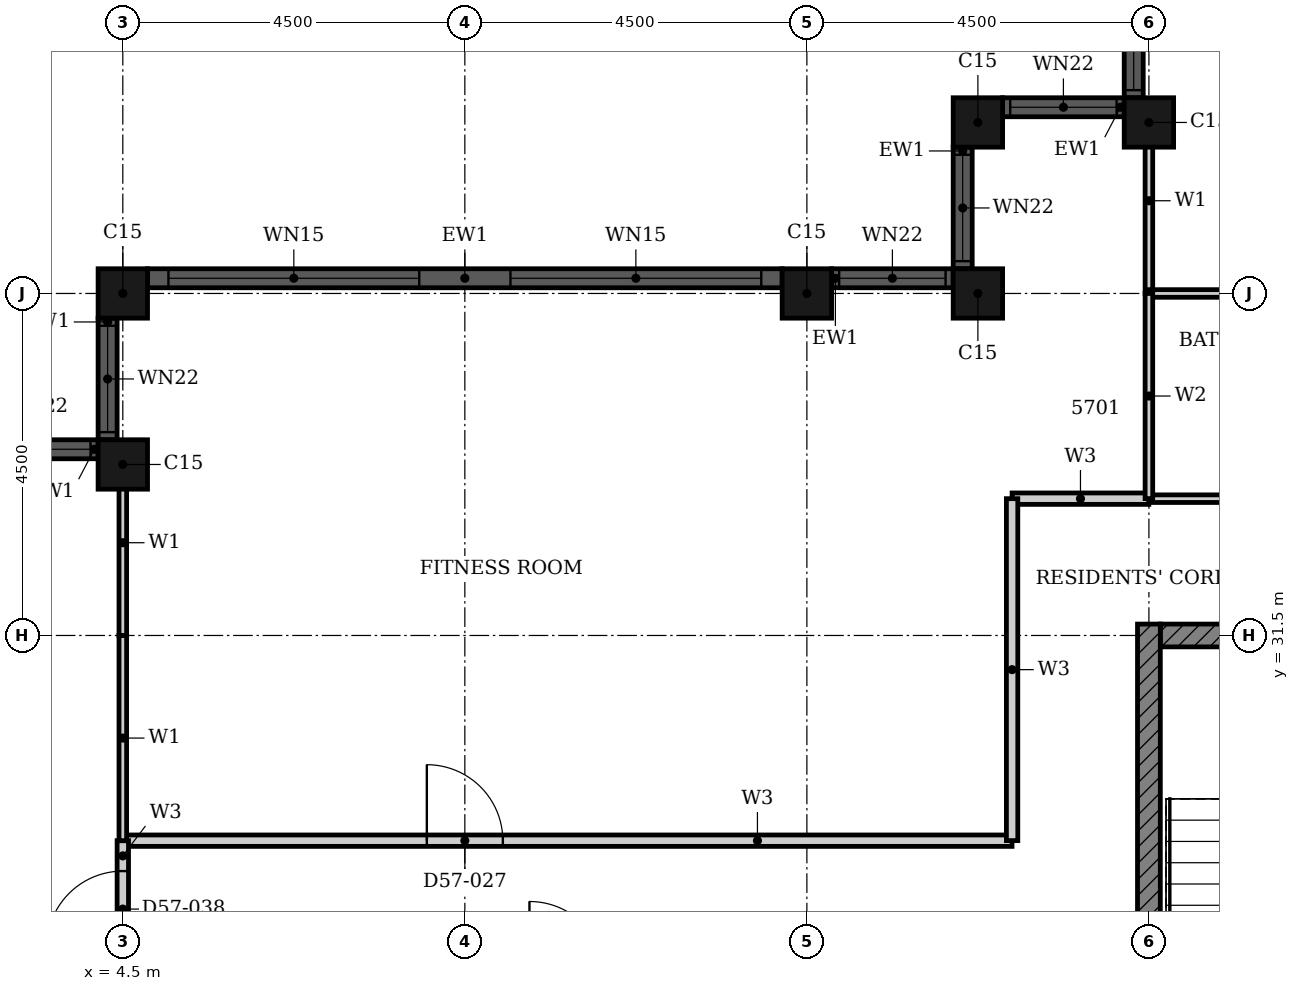
"""IFC4 building model, lengths in metres.
Left out: names, types, materials, properties, quantities, classifications, styles, units other than length and angle.
Written with IfcOpenShell. Run it as: python <this file> out.ifc"""

import sys

from ifc_helpers import new_model, si_unit, direction, frame, frame_2d, origin, origin_2d, place, context, subcontext, project, spatial, rectangle, hollow_rectangle, extrude, element, fill, save


model = new_model("IFC4")
c1 = context("Model", 3, precision=1e-05, world=origin(), true_north=direction((0.0, 1.0)))
c2 = subcontext(c1, "Body", "Model", "MODEL_VIEW")
j1 = project(units=[si_unit("LENGTHUNIT", "METRE"), si_unit("PLANEANGLEUNIT", "RADIAN")], contexts=[c1])
p1 = place(None, origin())
s1 = spatial("IfcSite", under=j1, at=p1, CompositionType="ELEMENT")
p2 = place(p1, origin())
s2 = spatial("IfcBuilding", under=s1, at=p2, CompositionType="ELEMENT")
p3 = place(p2, frame((0.0, 0.0, 225.7)))
s3 = spatial("IfcBuildingStorey", under=s2, at=p3, CompositionType="ELEMENT", Elevation=225.7)
for number, where, z_axis, x_axis in (
    (1, (18.0, 38.25, 0.0), (0.0, 0.0, 1.0), (1.0, 0.0, 0.0)),
    (2, (15.75, 38.25, 0.0), (0.0, 0.0, 1.0), (1.0, 0.0, 0.0)),
    (3, (15.75, 36.0, 0.0), (0.0, 0.0, 1.0), (1.0, 0.0, 0.0)),
    (4, (13.5, 36.0, 0.0), (0.0, 0.0, 1.0), (1.0, 0.0, 0.0)),
    (5, (4.5, 36.0, 0.0), (0.0, 0.0, 1.0), (1.0, 0.0, 0.0)),
    (6, (4.5, 33.75, 0.0), (0.0, 0.0, 1.0), (1.0, 0.0, 0.0)),
):
    element("IfcColumn", number, at=place(p3, frame(where, z_axis=z_axis, x_axis=x_axis)), inside=s3, PredefinedType="COLUMN", context=c2, shape_type="SweptSolid", body=[
        extrude(hollow_rectangle(XDim=0.65, YDim=0.65, WallThickness=0.021, at=origin_2d()), origin(), (0.0, 0.0, 1.0), 3.7),
    ])
p4 = place(p3, frame((17.8, 40.175, 0.0), z_axis=(0.0, 0.0, 1.0), x_axis=(0.0, -1.0, 0.0)))
e7 = element("IfcWall", 7, at=p4, inside=s3, PredefinedType="SOLIDWALL", context=c2, shape_type="SweptSolid", body=[
    extrude(rectangle(XDim=1.6, YDim=0.25, at=frame_2d((0.8, 0.0))), origin(), (0.0, 0.0, 1.0), 3.7),
])
p5 = place(p4, frame((0.1, 0.0, 0.9)))
e8 = element("IfcOpeningElement", 8, at=p5, cuts=e7, PredefinedType="OPENING", context=c2, shape_type="SweptSolid", body=[
    extrude(rectangle(XDim=1.4, YDim=1.85, at=frame_2d((0.7, 0.925))), frame((0.0, 0.135, 0.0), z_axis=(0.0, -1.0, 0.0), x_axis=(1.0, 0.0, 0.0)), (0.0, 0.0, 1.0), 0.27),
])
p6 = place(p3, frame((17.675, 38.45, 0.0), z_axis=(0.0, 0.0, 1.0), x_axis=(-1.0, 0.0, 0.0)))
e9 = element("IfcWall", 9, at=p6, inside=s3, PredefinedType="SOLIDWALL", context=c2, shape_type="SweptSolid", body=[
    extrude(rectangle(XDim=1.6, YDim=0.25, at=frame_2d((0.8, 0.0))), origin(), (0.0, 0.0, 1.0), 3.7),
])
p7 = place(p6, frame((0.1, 0.0, 0.9)))
e10 = element("IfcOpeningElement", 10, at=p7, cuts=e9, PredefinedType="OPENING", context=c2, shape_type="SweptSolid", body=[
    extrude(rectangle(XDim=1.4, YDim=1.85, at=frame_2d((0.7, 0.925))), frame((0.0, 0.135, 0.0), z_axis=(0.0, -1.0, 0.0), x_axis=(1.0, 0.0, 0.0)), (0.0, 0.0, 1.0), 0.27),
])
p8 = place(p3, frame((15.55, 37.925, 0.0), z_axis=(0.0, 0.0, 1.0), x_axis=(0.0, -1.0, 0.0)))
e11 = element("IfcWall", 11, at=p8, inside=s3, PredefinedType="SOLIDWALL", context=c2, shape_type="SweptSolid", body=[
    extrude(rectangle(XDim=1.6, YDim=0.25, at=frame_2d((0.8, 0.0))), origin(), (0.0, 0.0, 1.0), 3.7),
])
p9 = place(p8, frame((0.1, 0.0, 0.9)))
e12 = element("IfcOpeningElement", 12, at=p9, cuts=e11, PredefinedType="OPENING", context=c2, shape_type="SweptSolid", body=[
    extrude(rectangle(XDim=1.4, YDim=1.85, at=frame_2d((0.7, 0.925))), frame((0.0, 0.135, 0.0), z_axis=(0.0, -1.0, 0.0), x_axis=(1.0, 0.0, 0.0)), (0.0, 0.0, 1.0), 0.27),
])
p10 = place(p3, frame((15.425, 36.2, 0.0), z_axis=(0.0, 0.0, 1.0), x_axis=(-1.0, 0.0, 0.0)))
e13 = element("IfcWall", 13, at=p10, inside=s3, PredefinedType="SOLIDWALL", context=c2, shape_type="SweptSolid", body=[
    extrude(rectangle(XDim=1.6, YDim=0.25, at=frame_2d((0.8, 0.0))), origin(), (0.0, 0.0, 1.0), 3.7),
])
p11 = place(p10, frame((0.1, 0.0, 0.9)))
e14 = element("IfcOpeningElement", 14, at=p11, cuts=e13, PredefinedType="OPENING", context=c2, shape_type="SweptSolid", body=[
    extrude(rectangle(XDim=1.4, YDim=1.85, at=frame_2d((0.7, 0.925))), frame((0.0, 0.135, 0.0), z_axis=(0.0, -1.0, 0.0), x_axis=(1.0, 0.0, 0.0)), (0.0, 0.0, 1.0), 0.27),
])
p12 = place(p3, frame((13.175, 36.2, 0.0), z_axis=(0.0, 0.0, 1.0), x_axis=(-1.0, 0.0, 0.0)))
e15 = element("IfcWall", 15, at=p12, inside=s3, PredefinedType="SOLIDWALL", context=c2, shape_type="SweptSolid", body=[
    extrude(rectangle(XDim=8.35, YDim=0.25, at=frame_2d((4.175, 0.0))), origin(), (0.0, 0.0, 1.0), 3.7),
])
p13 = place(p12, frame((0.275, 0.0, 0.45)))
e16 = element("IfcOpeningElement", 16, at=p13, cuts=e15, PredefinedType="OPENING", context=c2, shape_type="SweptSolid", body=[
    extrude(rectangle(XDim=3.3, YDim=2.3, at=frame_2d((1.65, 1.15))), frame((0.0, 0.135, 0.0), z_axis=(0.0, -1.0, 0.0), x_axis=(1.0, 0.0, 0.0)), (0.0, 0.0, 1.0), 0.27),
])
p14 = place(p12, frame((4.775, 0.0, 0.45)))
e17 = element("IfcOpeningElement", 17, at=p14, cuts=e15, PredefinedType="OPENING", context=c2, shape_type="SweptSolid", body=[
    extrude(rectangle(XDim=3.3, YDim=2.3, at=frame_2d((1.65, 1.15))), frame((0.0, 0.135, 0.0), z_axis=(0.0, -1.0, 0.0), x_axis=(1.0, 0.0, 0.0)), (0.0, 0.0, 1.0), 0.27),
])
p15 = place(p3, frame((4.3, 35.675, 0.0), z_axis=(0.0, 0.0, 1.0), x_axis=(0.0, -1.0, 0.0)))
e18 = element("IfcWall", 18, at=p15, inside=s3, PredefinedType="SOLIDWALL", context=c2, shape_type="SweptSolid", body=[
    extrude(rectangle(XDim=1.6, YDim=0.25, at=frame_2d((0.8, 0.0))), origin(), (0.0, 0.0, 1.0), 3.7),
])
p16 = place(p15, frame((0.1, 0.0, 0.9)))
e19 = element("IfcOpeningElement", 19, at=p16, cuts=e18, PredefinedType="OPENING", context=c2, shape_type="SweptSolid", body=[
    extrude(rectangle(XDim=1.4, YDim=1.85, at=frame_2d((0.7, 0.925))), frame((0.0, 0.135, 0.0), z_axis=(0.0, -1.0, 0.0), x_axis=(1.0, 0.0, 0.0)), (0.0, 0.0, 1.0), 0.27),
])
p17 = place(p3, frame((4.175, 33.95, 0.0), z_axis=(0.0, 0.0, 1.0), x_axis=(-1.0, 0.0, 0.0)))
e20 = element("IfcWall", 20, at=p17, inside=s3, PredefinedType="SOLIDWALL", context=c2, shape_type="SweptSolid", body=[
    extrude(rectangle(XDim=1.6, YDim=0.25, at=frame_2d((0.8, 0.0))), origin(), (0.0, 0.0, 1.0), 3.7),
])
p18 = place(p17, frame((0.1, 0.0, 0.9)))
e21 = element("IfcOpeningElement", 21, at=p18, cuts=e20, PredefinedType="OPENING", context=c2, shape_type="SweptSolid", body=[
    extrude(rectangle(XDim=1.4, YDim=1.85, at=frame_2d((0.7, 0.925))), frame((0.0, 0.135, 0.0), z_axis=(0.0, -1.0, 0.0), x_axis=(1.0, 0.0, 0.0)), (0.0, 0.0, 1.0), 0.27),
])
p19 = place(p3, frame((18.15, 31.5, 0.0), z_axis=(0.0, 0.0, 1.0), x_axis=(1.0, 0.0, 0.0)))
e22 = element("IfcWall", 22, at=p19, inside=s3, PredefinedType="SHEAR", context=c2, shape_type="SweptSolid", body=[
    extrude(rectangle(XDim=9.368, YDim=0.3, at=frame_2d((4.684, 0.0))), origin(), (0.0, 0.0, 1.0), 3.4),
])
p20 = place(p19, frame((4.736, 0.0, 0.0)))
e23 = element("IfcOpeningElement", 23, at=p20, cuts=e22, PredefinedType="OPENING", context=c2, shape_type="SweptSolid", body=[
    extrude(rectangle(XDim=1.8, YDim=2.1, at=frame_2d((0.9, 1.05))), frame((0.0, 0.16, 0.0), z_axis=(0.0, -1.0, 0.0), x_axis=(1.0, 0.0, 0.0)), (0.0, 0.0, 1.0), 0.32),
])
p21 = place(p3, frame((18.0, 22.35, 0.0), z_axis=(0.0, 0.0, 1.0), x_axis=(0.0, 1.0, 0.0)))
e24 = element("IfcWall", 24, at=p21, inside=s3, PredefinedType="SHEAR", context=c2, shape_type="SweptSolid", body=[
    extrude(rectangle(XDim=9.3, YDim=0.3, at=frame_2d((4.65, 0.0))), origin(), (0.0, 0.0, 1.0), 3.4),
])
p22 = place(p3, frame((4.5, 28.8, 0.0), z_axis=(0.0, 0.0, 1.0), x_axis=(1.0, 0.0, 0.0)))
e25 = element("IfcWall", 25, at=p22, inside=s3, PredefinedType="PARTITIONING", context=c2, shape_type="SweptSolid", body=[
    extrude(rectangle(XDim=11.699, YDim=0.15, at=frame_2d((5.85, 0.0))), origin(), (0.0, 0.0, 1.0), 3.4),
])
p23 = place(p22, frame((4.0, 0.0, 0.0)))
e26 = element("IfcOpeningElement", 26, at=p23, cuts=e25, PredefinedType="OPENING", context=c2, shape_type="SweptSolid", body=[
    extrude(rectangle(XDim=1.0, YDim=2.1, at=frame_2d((0.5, 1.05))), frame((0.0, 0.085, 0.0), z_axis=(0.0, -1.0, 0.0), x_axis=(1.0, 0.0, 0.0)), (0.0, 0.0, 1.0), 0.17),
])
p24 = place(p3, frame((16.2, 33.3, 0.0), z_axis=(0.0, 0.0, 1.0), x_axis=(1.0, 0.0, 0.0)))
e27 = element("IfcWall", 27, at=p24, inside=s3, PredefinedType="PARTITIONING", context=c2, shape_type="SweptSolid", body=[
    extrude(rectangle(XDim=1.799, YDim=0.15, at=frame_2d((0.899, 0.0))), origin(), (0.0, 0.0, 1.0), 3.4),
])
p25 = place(p3, frame((16.2, 28.801, 0.0), z_axis=(0.0, 0.0, 1.0), x_axis=(0.0, 1.0, 0.0)))
e28 = element("IfcWall", 28, at=p25, inside=s3, PredefinedType="PARTITIONING", context=c2, shape_type="SweptSolid", body=[
    extrude(rectangle(XDim=4.499, YDim=0.15, at=frame_2d((2.25, 0.0))), origin(), (0.0, 0.0, 1.0), 3.4),
])
p26 = place(p3, frame((4.5, 27.0, 0.0), z_axis=(0.0, 0.0, 1.0), x_axis=(0.0, 1.0, 0.0)))
e29 = element("IfcWall", 29, at=p26, inside=s3, PredefinedType="PARTITIONING", context=c2, shape_type="SweptSolid", body=[
    extrude(rectangle(XDim=1.8, YDim=0.15, at=frame_2d((0.9, 0.0))), origin(), (0.0, 0.0, 1.0), 3.4),
])
p27 = place(p26, frame((0.4, 0.0, 0.0)))
e30 = element("IfcOpeningElement", 30, at=p27, cuts=e29, PredefinedType="OPENING", context=c2, shape_type="SweptSolid", body=[
    extrude(rectangle(XDim=1.0, YDim=2.1, at=frame_2d((0.5, 1.05))), frame((0.0, 0.085, 0.0), z_axis=(0.0, -1.0, 0.0), x_axis=(1.0, 0.0, 0.0)), (0.0, 0.0, 1.0), 0.17),
])
p28 = place(p3, frame((18.0, 36.0, 0.0), z_axis=(0.0, 0.0, 1.0), x_axis=(0.0, 1.0, 0.0)))
e31 = element("IfcWall", 31, at=p28, inside=s3, PredefinedType="PARTITIONING", context=c2, shape_type="SweptSolid", body=[
    extrude(rectangle(XDim=2.44, YDim=0.1, at=frame_2d((1.22, 0.0))), origin(), (0.0, 0.0, 1.0), 3.4),
])
p29 = place(p3, frame((4.5, 28.8, 0.0), z_axis=(0.0, 0.0, 1.0), x_axis=(0.0, 1.0, 0.0)))
e32 = element("IfcWall", 32, at=p29, inside=s3, PredefinedType="PARTITIONING", context=c2, shape_type="SweptSolid", body=[
    extrude(rectangle(XDim=2.7, YDim=0.1, at=frame_2d((1.35, 0.0))), origin(), (0.0, 0.0, 1.0), 3.4),
])
p30 = place(p3, frame((4.5, 31.501, 0.0), z_axis=(0.0, 0.0, 1.0), x_axis=(0.0, 1.0, 0.0)))
e33 = element("IfcWall", 33, at=p30, inside=s3, PredefinedType="PARTITIONING", context=c2, shape_type="SweptSolid", body=[
    extrude(rectangle(XDim=2.439, YDim=0.1, at=frame_2d((1.219, 0.0))), origin(), (0.0, 0.0, 1.0), 3.4),
])
for number, where, z_axis, x_axis in (
    (34, (18.0, 33.3, 0.0), (0.0, 0.0, 1.0), (1.0, 0.0, 0.0)),
    (35, (18.0, 36.0, 0.0), (0.0, 0.0, 1.0), (1.0, 0.0, 0.0)),
):
    element("IfcWall", number, at=place(p3, frame(where, z_axis=z_axis, x_axis=x_axis)), inside=s3, PredefinedType="PARTITIONING", context=c2, shape_type="SweptSolid", body=[
        extrude(rectangle(XDim=2.4, YDim=0.1, at=frame_2d((1.2, 0.0))), origin(), (0.0, 0.0, 1.0), 3.4),
    ])
p31 = place(p3, frame((18.0, 33.301, 0.0), z_axis=(0.0, 0.0, 1.0), x_axis=(0.0, 1.0, 0.0)))
e36 = element("IfcWall", 36, at=p31, inside=s3, PredefinedType="PARTITIONING", context=c2, shape_type="SweptSolid", body=[
    extrude(rectangle(XDim=2.699, YDim=0.1, at=frame_2d((1.35, 0.0))), origin(), (0.0, 0.0, 1.0), 3.4),
])
p32 = place(p5, origin())
e37 = element("IfcWindow", 37, at=p32, inside=s3, PartitioningType="SINGLE_PANEL", PredefinedType="WINDOW", context=c2, shape_type="SweptSolid", body=[
    extrude(rectangle(XDim=1.4, YDim=1.85, at=frame_2d((0.7, 0.925))), frame((0.0, 0.03, 0.0), z_axis=(0.0, -1.0, 0.0), x_axis=(1.0, 0.0, 0.0)), (0.0, 0.0, 1.0), 0.06),
])
fill(e8, e37)
p33 = place(p7, origin())
e38 = element("IfcWindow", 38, at=p33, inside=s3, PartitioningType="SINGLE_PANEL", PredefinedType="WINDOW", context=c2, shape_type="SweptSolid", body=[
    extrude(rectangle(XDim=1.4, YDim=1.85, at=frame_2d((0.7, 0.925))), frame((0.0, 0.03, 0.0), z_axis=(0.0, -1.0, 0.0), x_axis=(1.0, 0.0, 0.0)), (0.0, 0.0, 1.0), 0.06),
])
fill(e10, e38)
p34 = place(p9, origin())
e39 = element("IfcWindow", 39, at=p34, inside=s3, PartitioningType="SINGLE_PANEL", PredefinedType="WINDOW", context=c2, shape_type="SweptSolid", body=[
    extrude(rectangle(XDim=1.4, YDim=1.85, at=frame_2d((0.7, 0.925))), frame((0.0, 0.03, 0.0), z_axis=(0.0, -1.0, 0.0), x_axis=(1.0, 0.0, 0.0)), (0.0, 0.0, 1.0), 0.06),
])
fill(e12, e39)
p35 = place(p11, origin())
e40 = element("IfcWindow", 40, at=p35, inside=s3, PartitioningType="SINGLE_PANEL", PredefinedType="WINDOW", context=c2, shape_type="SweptSolid", body=[
    extrude(rectangle(XDim=1.4, YDim=1.85, at=frame_2d((0.7, 0.925))), frame((0.0, 0.03, 0.0), z_axis=(0.0, -1.0, 0.0), x_axis=(1.0, 0.0, 0.0)), (0.0, 0.0, 1.0), 0.06),
])
fill(e14, e40)
p36 = place(p13, origin())
e41 = element("IfcWindow", 41, at=p36, inside=s3, PartitioningType="SINGLE_PANEL", PredefinedType="WINDOW", context=c2, shape_type="SweptSolid", body=[
    extrude(rectangle(XDim=3.3, YDim=2.3, at=frame_2d((1.65, 1.15))), frame((0.0, 0.03, 0.0), z_axis=(0.0, -1.0, 0.0), x_axis=(1.0, 0.0, 0.0)), (0.0, 0.0, 1.0), 0.06),
])
fill(e16, e41)
p37 = place(p14, origin())
e42 = element("IfcWindow", 42, at=p37, inside=s3, PartitioningType="SINGLE_PANEL", PredefinedType="WINDOW", context=c2, shape_type="SweptSolid", body=[
    extrude(rectangle(XDim=3.3, YDim=2.3, at=frame_2d((1.65, 1.15))), frame((0.0, 0.03, 0.0), z_axis=(0.0, -1.0, 0.0), x_axis=(1.0, 0.0, 0.0)), (0.0, 0.0, 1.0), 0.06),
])
fill(e17, e42)
p38 = place(p16, origin())
e43 = element("IfcWindow", 43, at=p38, inside=s3, PartitioningType="SINGLE_PANEL", PredefinedType="WINDOW", context=c2, shape_type="SweptSolid", body=[
    extrude(rectangle(XDim=1.4, YDim=1.85, at=frame_2d((0.7, 0.925))), frame((0.0, 0.03, 0.0), z_axis=(0.0, -1.0, 0.0), x_axis=(1.0, 0.0, 0.0)), (0.0, 0.0, 1.0), 0.06),
])
fill(e19, e43)
p39 = place(p18, origin())
e44 = element("IfcWindow", 44, at=p39, inside=s3, PartitioningType="SINGLE_PANEL", PredefinedType="WINDOW", context=c2, shape_type="SweptSolid", body=[
    extrude(rectangle(XDim=1.4, YDim=1.85, at=frame_2d((0.7, 0.925))), frame((0.0, 0.03, 0.0), z_axis=(0.0, -1.0, 0.0), x_axis=(1.0, 0.0, 0.0)), (0.0, 0.0, 1.0), 0.06),
])
fill(e21, e44)
p40 = place(p23, origin())
e45 = element("IfcDoor", 45, at=p40, inside=s3, OperationType="SINGLE_SWING_LEFT", PredefinedType="DOOR", context=c2, shape_type="SweptSolid", body=[
    extrude(rectangle(XDim=1.0, YDim=2.1, at=frame_2d((0.5, 1.05))), frame((0.0, 0.025, 0.0), z_axis=(0.0, -1.0, 0.0), x_axis=(1.0, 0.0, 0.0)), (0.0, 0.0, 1.0), 0.05),
])
fill(e26, e45)
p41 = place(p27, origin())
e46 = element("IfcDoor", 46, at=p41, inside=s3, OperationType="SINGLE_SWING_RIGHT", PredefinedType="DOOR", context=c2, shape_type="SweptSolid", body=[
    extrude(rectangle(XDim=1.0, YDim=2.1, at=frame_2d((0.5, 1.05))), frame((0.0, 0.025, 0.0), z_axis=(0.0, -1.0, 0.0), x_axis=(1.0, 0.0, 0.0)), (0.0, 0.0, 1.0), 0.05),
])
fill(e30, e46)
save(model, sys.argv[1])
